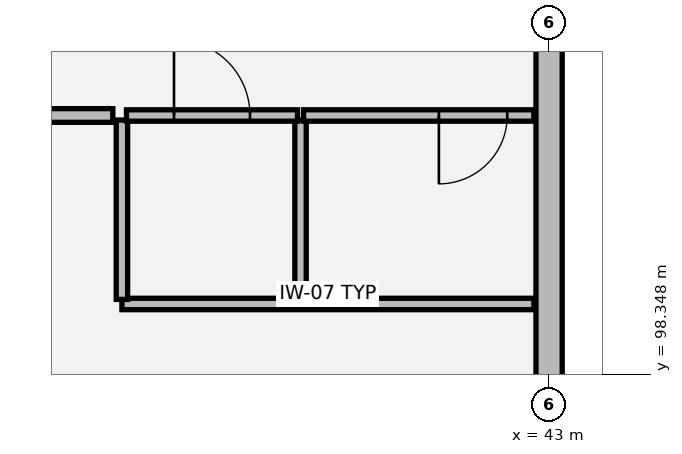
"""IFC4 building model, lengths in metres.
Left out: names, types, materials, properties, quantities, classifications, styles, units other than length and angle.
Written with IfcOpenShell. Run it as: python <this file> out.ifc"""

import sys

from ifc_helpers import new_model, si_unit, direction, frame, frame_2d, origin, place, context, subcontext, project, spatial, rectangle, extrude, element, fill, save


model = new_model("IFC4")
c1 = context("Model", 3, precision=1e-05, world=origin(), true_north=direction((0.0, 1.0)))
c2 = subcontext(c1, "Body", "Model", "MODEL_VIEW")
j1 = project(units=[si_unit("LENGTHUNIT", "METRE"), si_unit("PLANEANGLEUNIT", "RADIAN")], contexts=[c1])
p1 = place(None, origin())
s1 = spatial("IfcSite", under=j1, at=p1, CompositionType="ELEMENT")
p2 = place(p1, origin())
s2 = spatial("IfcBuilding", under=s1, at=p2, CompositionType="ELEMENT")
p3 = place(p2, frame((0.0, 0.0, 9.18)))
s3 = spatial("IfcBuildingStorey", under=s2, at=p3, CompositionType="ELEMENT", Elevation=9.18)
p4 = place(p3, frame((43.0, 96.333, 0.0), z_axis=(0.0, 0.0, 1.0), x_axis=(0.0, 1.0, 0.0)))
e1 = element("IfcWall", 1, at=p4, inside=s3, PredefinedType="SOLIDWALL", context=c2, shape_type="SweptSolid", body=[
    extrude(rectangle(XDim=7.334, YDim=0.345, at=frame_2d((3.667, 0.0))), origin(), (0.0, 0.0, 1.0), 3.48),
])
p5 = place(p3, frame((37.38, 99.27, 0.0), z_axis=(0.0, 0.0, 1.0), x_axis=(1.0, 0.0, 0.0)))
e2 = element("IfcWall", 2, at=p5, inside=s3, PredefinedType="PARTITIONING", context=c2, shape_type="SweptSolid", body=[
    extrude(rectangle(XDim=5.42, YDim=0.15, at=frame_2d((2.71, 0.0))), origin(), (0.0, 0.0, 1.0), 3.18),
])
for number, where, z_axis, x_axis in (
    (3, (37.38, 99.33, 0.0), (0.0, 0.0, 1.0), (0.0, 1.0, 0.0)),
    (4, (39.73, 99.33, 0.0), (0.0, 0.0, 1.0), (0.0, 1.0, 0.0)),
):
    element("IfcWall", number, at=place(p3, frame(where, z_axis=z_axis, x_axis=x_axis)), inside=s3, PredefinedType="PARTITIONING", context=c2, shape_type="SweptSolid", body=[
        extrude(rectangle(XDim=2.36, YDim=0.15, at=frame_2d((1.18, 0.0))), origin(), (0.0, 0.0, 1.0), 3.18),
    ])
p6 = place(p3, frame((37.44, 101.75, 0.0), z_axis=(0.0, 0.0, 1.0), x_axis=(1.0, 0.0, 0.0)))
e5 = element("IfcWall", 5, at=p6, inside=s3, PredefinedType="PARTITIONING", context=c2, shape_type="SweptSolid", body=[
    extrude(rectangle(XDim=2.25, YDim=0.15, at=frame_2d((1.125, 0.0))), origin(), (0.0, 0.0, 1.0), 3.18),
])
p7 = place(p6, frame((0.625, 0.0, 0.0)))
e6 = element("IfcOpeningElement", 6, at=p7, cuts=e5, PredefinedType="OPENING", context=c2, shape_type="SweptSolid", body=[
    extrude(rectangle(XDim=1.0, YDim=2.15, at=frame_2d((0.5, 1.075))), frame((0.0, 0.085, 0.0), z_axis=(0.0, -1.0, 0.0), x_axis=(1.0, 0.0, 0.0)), (0.0, 0.0, 1.0), 0.17),
])
p8 = place(p3, frame((39.77, 101.75, 0.0), z_axis=(0.0, 0.0, 1.0), x_axis=(1.0, 0.0, 0.0)))
e7 = element("IfcWall", 7, at=p8, inside=s3, PredefinedType="PARTITIONING", context=c2, shape_type="SweptSolid", body=[
    extrude(rectangle(XDim=3.03, YDim=0.15, at=frame_2d((1.515, 0.0))), origin(), (0.0, 0.0, 1.0), 3.18),
])
p9 = place(p8, frame((1.78, 0.0, 0.0)))
e8 = element("IfcOpeningElement", 8, at=p9, cuts=e7, PredefinedType="OPENING", context=c2, shape_type="SweptSolid", body=[
    extrude(rectangle(XDim=0.9, YDim=2.15, at=frame_2d((0.45, 1.075))), frame((0.0, 0.085, 0.0), z_axis=(0.0, -1.0, 0.0), x_axis=(1.0, 0.0, 0.0)), (0.0, 0.0, 1.0), 0.17),
])
p10 = place(p3, frame((27.89, 101.75, 0.0), z_axis=(0.0, 0.0, 1.0), x_axis=(1.0, 0.0, 0.0)))
e9 = element("IfcWall", 9, at=p10, inside=s3, PredefinedType="PARTITIONING", context=c2, shape_type="SweptSolid", body=[
    extrude(rectangle(XDim=9.37, YDim=0.18, at=frame_2d((4.685, 0.0))), origin(), (0.0, 0.0, 1.0), 3.18),
])
p11 = place(p10, frame((4.055, 0.0, 0.0)))
e10 = element("IfcOpeningElement", 10, at=p11, cuts=e9, PredefinedType="OPENING", context=c2, shape_type="SweptSolid", body=[
    extrude(rectangle(XDim=1.26, YDim=2.2, at=frame_2d((0.63, 1.1))), frame((0.0, 0.1, 0.0), z_axis=(0.0, -1.0, 0.0), x_axis=(1.0, 0.0, 0.0)), (0.0, 0.0, 1.0), 0.2),
])
p12 = place(p7, origin())
e11 = element("IfcDoor", 11, at=p12, inside=s3, OperationType="SINGLE_SWING_LEFT", PredefinedType="DOOR", context=c2, shape_type="SweptSolid", body=[
    extrude(rectangle(XDim=1.0, YDim=2.15, at=frame_2d((0.5, 1.075))), frame((0.0, 0.025, 0.0), z_axis=(0.0, -1.0, 0.0), x_axis=(1.0, 0.0, 0.0)), (0.0, 0.0, 1.0), 0.05),
])
fill(e6, e11)
p13 = place(p9, origin())
e12 = element("IfcDoor", 12, at=p13, inside=s3, OperationType="SINGLE_SWING_RIGHT", PredefinedType="DOOR", context=c2, shape_type="SweptSolid", body=[
    extrude(rectangle(XDim=0.9, YDim=2.15, at=frame_2d((0.45, 1.075))), frame((0.0, 0.025, 0.0), z_axis=(0.0, -1.0, 0.0), x_axis=(1.0, 0.0, 0.0)), (0.0, 0.0, 1.0), 0.05),
])
fill(e8, e12)
save(model, sys.argv[1])
